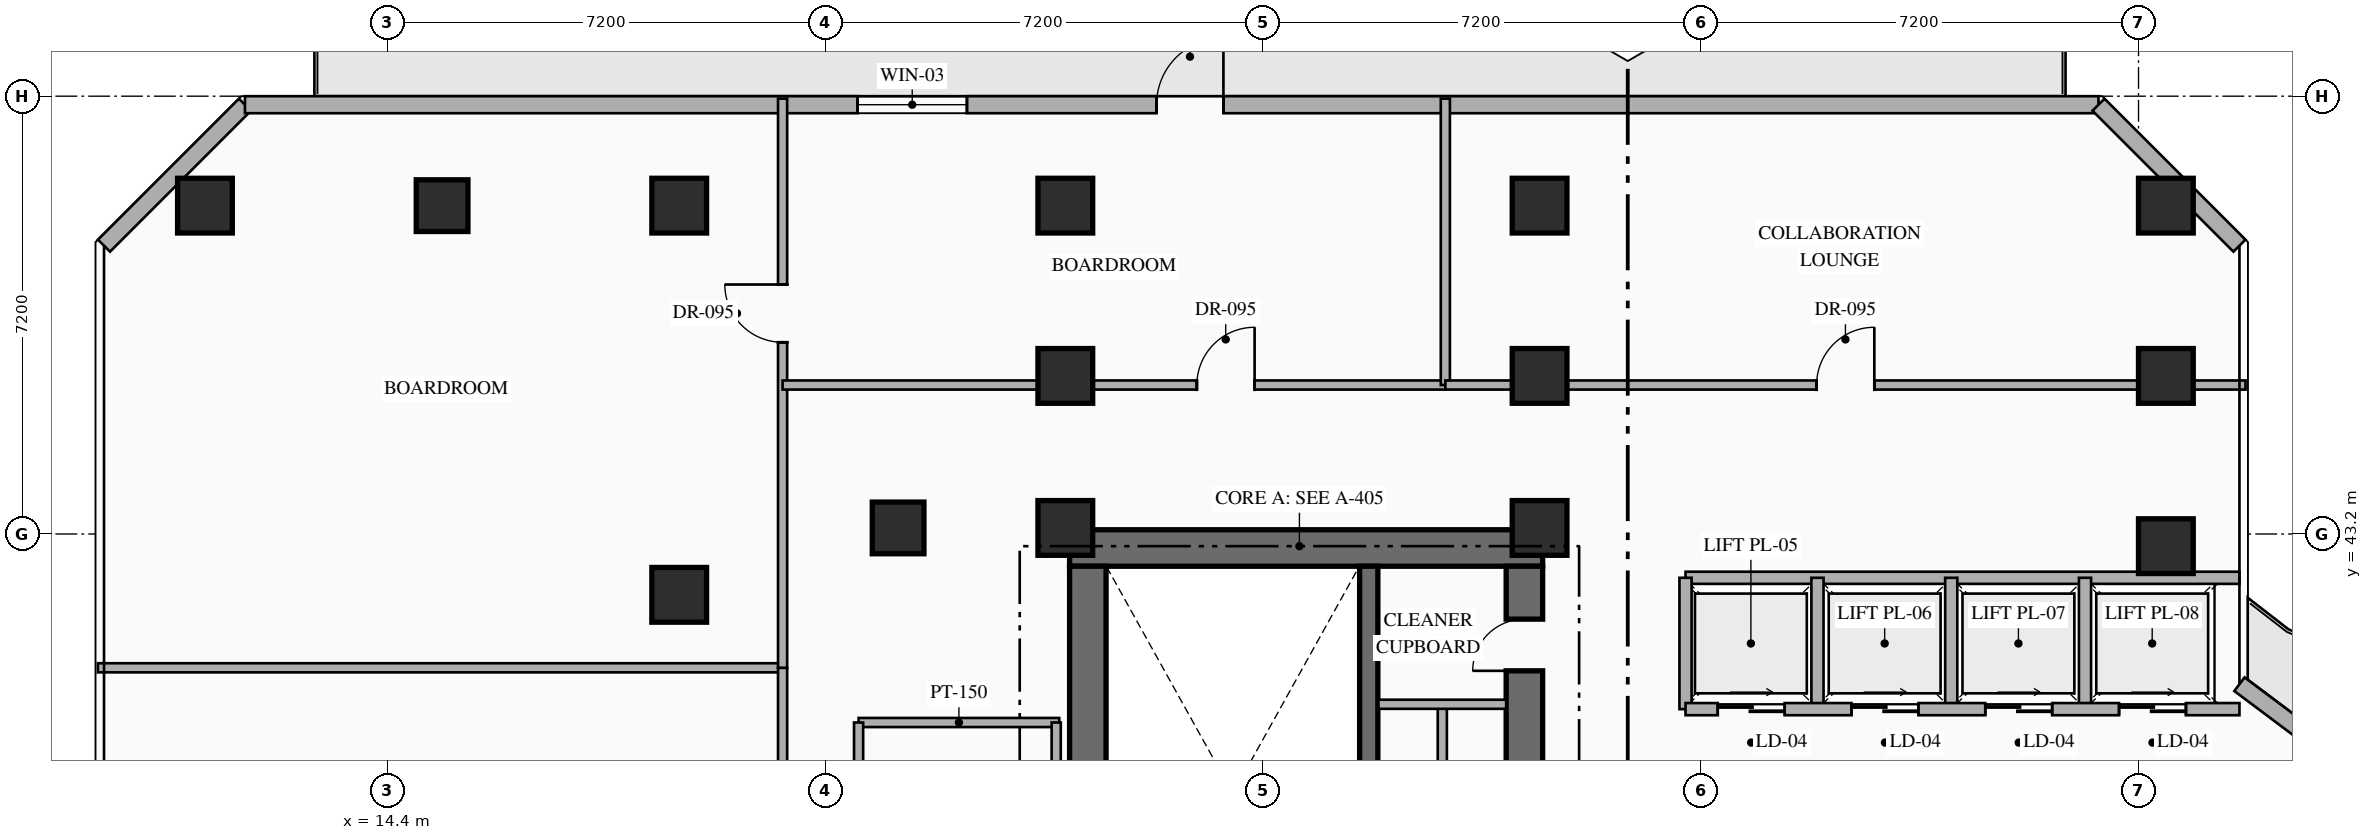
"""IFC4 building model, lengths in metres.
Left out: names, types, materials, properties, quantities, classifications, styles, units other than length and angle.
Written with IfcOpenShell. Run it as: python <this file> out.ifc"""

import sys

from ifc_helpers import new_model, si_unit, direction, frame, frame_2d, origin, origin_2d, place, context, subcontext, project, spatial, rectangle, hollow_rectangle, extrude, element, fill, save


model = new_model("IFC4")
c1 = context("Model", 3, precision=1e-05, world=origin(), true_north=direction((0.0, 1.0)))
c2 = subcontext(c1, "Body", "Model", "MODEL_VIEW")
j1 = project(units=[si_unit("LENGTHUNIT", "METRE"), si_unit("PLANEANGLEUNIT", "RADIAN")], contexts=[c1])
p1 = place(None, origin())
s1 = spatial("IfcSite", under=j1, at=p1, CompositionType="ELEMENT")
p2 = place(p1, origin())
s2 = spatial("IfcBuilding", under=s1, at=p2, CompositionType="ELEMENT")
p3 = place(p2, frame((0.0, 0.0, 119.25)))
s3 = spatial("IfcBuildingStorey", under=s2, at=p3, CompositionType="ELEMENT", Elevation=119.25)
p4 = place(p3, frame((25.62, 42.97, 0.0), z_axis=(0.0, 0.0, 1.0), x_axis=(1.0, 0.0, 0.0)))
e1 = element("IfcWall", 1, at=p4, inside=s3, PredefinedType="SHEAR", context=c2, shape_type="SweptSolid", body=[
    extrude(rectangle(XDim=7.78, YDim=0.6, at=frame_2d((3.89, 0.0))), origin(), (0.0, 0.0, 1.0), 3.6),
])
p5 = place(p3, frame((25.92, 33.19, 0.0), z_axis=(0.0, 0.0, 1.0), x_axis=(0.0, 1.0, 0.0)))
e2 = element("IfcWall", 2, at=p5, inside=s3, PredefinedType="SHEAR", context=c2, shape_type="SweptSolid", body=[
    extrude(rectangle(XDim=9.48, YDim=0.6, at=frame_2d((4.74, 0.0))), origin(), (0.0, 0.0, 1.0), 3.6),
])
p6 = place(p3, frame((33.1, 33.19, 0.0), z_axis=(0.0, 0.0, 1.0), x_axis=(0.0, 1.0, 0.0)))
e3 = element("IfcWall", 3, at=p6, inside=s3, PredefinedType="SHEAR", context=c2, shape_type="SweptSolid", body=[
    extrude(rectangle(XDim=9.48, YDim=0.6, at=frame_2d((4.74, 0.0))), origin(), (0.0, 0.0, 1.0), 3.6),
])
p7 = place(p6, frame((4.71, 0.0, 0.0)))
e4 = element("IfcOpeningElement", 4, at=p7, cuts=e3, PredefinedType="OPENING", context=c2, shape_type="SweptSolid", body=[
    extrude(rectangle(XDim=0.85, YDim=2.08, at=frame_2d((0.425, 1.04))), frame((0.0, 0.31, 0.0), z_axis=(0.0, -1.0, 0.0), x_axis=(1.0, 0.0, 0.0)), (0.0, 0.0, 1.0), 0.62),
])
p8 = place(p6, frame((7.76, 0.0, 0.0)))
e5 = element("IfcOpeningElement", 5, at=p8, cuts=e3, PredefinedType="OPENING", context=c2, shape_type="SweptSolid", body=[
    extrude(rectangle(XDim=0.85, YDim=2.08, at=frame_2d((0.425, 1.04))), frame((0.0, 0.31, 0.0), z_axis=(0.0, -1.0, 0.0), x_axis=(1.0, 0.0, 0.0)), (0.0, 0.0, 1.0), 0.62),
])
p9 = place(p3, frame((30.54, 33.19, 0.0), z_axis=(0.0, 0.0, 1.0), x_axis=(0.0, 1.0, 0.0)))
e6 = element("IfcWall", 6, at=p9, inside=s3, PredefinedType="SHEAR", context=c2, shape_type="SweptSolid", body=[
    extrude(rectangle(XDim=9.48, YDim=0.3, at=frame_2d((4.74, 0.0))), origin(), (0.0, 0.0, 1.0), 3.6),
])
for number, where, z_axis, x_axis in (
    (7, (25.55, 43.3, 0.0), (0.0, 0.0, 1.0), (1.0, 0.0, 0.0)),
    (8, (33.35, 43.3, 0.0), (0.0, 0.0, 1.0), (1.0, 0.0, 0.0)),
    (9, (43.65, 43.0, 0.0), (0.0, 0.0, 1.0), (1.0, 0.0, 0.0)),
):
    element("IfcColumn", number, at=place(p3, frame(where, z_axis=z_axis, x_axis=x_axis)), inside=s3, PredefinedType="COLUMN", context=c2, shape_type="SweptSolid", body=[
        extrude(rectangle(XDim=0.9, YDim=0.9, at=origin_2d()), origin(), (0.0, 0.0, 1.0), 3.6),
    ])
for number, where, z_axis, x_axis in (
    (10, (25.55, 45.8, 0.0), (0.0, 0.0, 1.0), (1.0, 0.0, 0.0)),
    (11, (33.35, 45.8, 0.0), (0.0, 0.0, 1.0), (1.0, 0.0, 0.0)),
    (12, (43.65, 45.8, 0.0), (0.0, 0.0, 1.0), (1.0, 0.0, 0.0)),
    (13, (11.4, 48.6, 0.0), (0.0, 0.0, 1.0), (1.0, 0.0, 0.0)),
    (14, (19.2, 48.6, 0.0), (0.0, 0.0, 1.0), (1.0, 0.0, 0.0)),
    (15, (25.55, 48.6, 0.0), (0.0, 0.0, 1.0), (1.0, 0.0, 0.0)),
    (16, (33.35, 48.6, 0.0), (0.0, 0.0, 1.0), (1.0, 0.0, 0.0)),
    (17, (43.65, 48.6, 0.0), (0.0, 0.0, 1.0), (1.0, 0.0, 0.0)),
    (18, (19.2, 42.2, 0.0), (0.0, 0.0, 1.0), (1.0, 0.0, 0.0)),
):
    element("IfcColumn", number, at=place(p3, frame(where, z_axis=z_axis, x_axis=x_axis)), inside=s3, PredefinedType="COLUMN", context=c2, shape_type="SweptSolid", body=[
        extrude(hollow_rectangle(XDim=0.9, YDim=0.9, WallThickness=0.036, at=origin_2d()), origin(), (0.0, 0.0, 1.0), 3.6),
    ])
for number, where, z_axis, x_axis in (
    (19, (22.8, 43.3, 0.0), (0.0, 0.0, 1.0), (1.0, 0.0, 0.0)),
    (20, (15.3, 48.6, 0.0), (0.0, 0.0, 1.0), (1.0, 0.0, 0.0)),
):
    element("IfcColumn", number, at=place(p3, frame(where, z_axis=z_axis, x_axis=x_axis)), inside=s3, PredefinedType="COLUMN", context=c2, shape_type="SweptSolid", body=[
        extrude(hollow_rectangle(XDim=0.85, YDim=0.85, WallThickness=0.032, at=origin_2d()), origin(), (0.0, 0.0, 1.0), 3.6),
    ])
p10 = place(p3, frame((44.86, 40.73, 0.0), z_axis=(0.0, 0.0, 1.0), x_axis=(0.800006902154, -0.599990797017, 0.0)))
e21 = element("IfcWall", 21, at=p10, inside=s3, PredefinedType="STANDARD", context=c2, shape_type="SweptSolid", body=[
    extrude(rectangle(XDim=29.712, YDim=0.28, at=frame_2d((14.856, 0.0))), origin(), (0.0, 0.0, 1.0), 3.35),
])
p11 = place(p10, frame((14.249, 0.0, 0.0)))
e22 = element("IfcOpeningElement", 22, at=p11, cuts=e21, PredefinedType="OPENING", context=c2, shape_type="SweptSolid", body=[
    extrude(rectangle(XDim=1.1, YDim=2.2, at=frame_2d((0.55, 1.1))), frame((0.0, 0.15, 0.0), z_axis=(0.0, -1.0, 0.0), x_axis=(1.0, 0.0, 0.0)), (0.0, 0.0, 1.0), 0.3),
])
p12 = place(p10, frame((6.528, 0.0, 0.85)))
e23 = element("IfcOpeningElement", 23, at=p12, cuts=e21, PredefinedType="OPENING", context=c2, shape_type="SweptSolid", body=[
    extrude(rectangle(XDim=1.8, YDim=2.1, at=frame_2d((0.9, 1.05))), frame((0.0, 0.15, 0.0), z_axis=(0.0, -1.0, 0.0), x_axis=(1.0, 0.0, 0.0)), (0.0, 0.0, 1.0), 0.3),
])
p13 = place(p10, frame((21.384, 0.0, 0.85)))
e24 = element("IfcOpeningElement", 24, at=p13, cuts=e21, PredefinedType="OPENING", context=c2, shape_type="SweptSolid", body=[
    extrude(rectangle(XDim=1.8, YDim=2.1, at=frame_2d((0.9, 1.05))), frame((0.0, 0.15, 0.0), z_axis=(0.0, -1.0, 0.0), x_axis=(1.0, 0.0, 0.0)), (0.0, 0.0, 1.0), 0.3),
])
p14 = place(p3, frame((9.74, 47.942, 0.0), z_axis=(0.0, 0.0, 1.0), x_axis=(0.707106781187, 0.707106781187, 0.0)))
e25 = element("IfcWall", 25, at=p14, inside=s3, PredefinedType="STANDARD", context=c2, shape_type="SweptSolid", body=[
    extrude(rectangle(XDim=3.278, YDim=0.28, at=frame_2d((1.639, 0.0))), origin(), (0.0, 0.0, 1.0), 3.35),
])
p15 = place(p3, frame((12.058, 50.26, 0.0), z_axis=(0.0, 0.0, 1.0), x_axis=(1.0, 0.0, 0.0)))
e26 = element("IfcWall", 26, at=p15, inside=s3, PredefinedType="STANDARD", context=c2, shape_type="SweptSolid", body=[
    extrude(rectangle(XDim=30.484, YDim=0.28, at=frame_2d((15.242, 0.0))), origin(), (0.0, 0.0, 1.0), 3.35),
])
p16 = place(p15, frame((14.992, 0.0, 0.0)))
e27 = element("IfcOpeningElement", 27, at=p16, cuts=e26, PredefinedType="OPENING", context=c2, shape_type="SweptSolid", body=[
    extrude(rectangle(XDim=1.1, YDim=2.2, at=frame_2d((0.55, 1.1))), frame((0.0, 0.15, 0.0), z_axis=(0.0, -1.0, 0.0), x_axis=(1.0, 0.0, 0.0)), (0.0, 0.0, 1.0), 0.3),
])
p17 = place(p15, frame((10.074, 0.0, 0.85)))
e28 = element("IfcOpeningElement", 28, at=p17, cuts=e26, PredefinedType="OPENING", context=c2, shape_type="SweptSolid", body=[
    extrude(rectangle(XDim=1.8, YDim=2.1, at=frame_2d((0.9, 1.05))), frame((0.0, 0.15, 0.0), z_axis=(0.0, -1.0, 0.0), x_axis=(1.0, 0.0, 0.0)), (0.0, 0.0, 1.0), 0.3),
])
p18 = place(p3, frame((42.542, 50.26, 0.0), z_axis=(0.0, 0.0, 1.0), x_axis=(0.707106781187, -0.707106781187, 0.0)))
e29 = element("IfcWall", 29, at=p18, inside=s3, PredefinedType="STANDARD", context=c2, shape_type="SweptSolid", body=[
    extrude(rectangle(XDim=3.278, YDim=0.28, at=frame_2d((1.639, 0.0))), origin(), (0.0, 0.0, 1.0), 3.35),
])
p19 = place(p3, frame((31.75, 36.18, 0.0), z_axis=(0.0, 0.0, 1.0), x_axis=(0.0, 1.0, 0.0)))
e30 = element("IfcWall", 30, at=p19, inside=s3, PredefinedType="PARTITIONING", context=c2, shape_type="SweptSolid", body=[
    extrude(rectangle(XDim=4.24, YDim=0.15, at=frame_2d((2.12, 0.0))), origin(), (0.0, 0.0, 1.0), 3.35),
])
p20 = place(p19, frame((1.695, 0.0, 0.0)))
e31 = element("IfcOpeningElement", 31, at=p20, cuts=e30, PredefinedType="OPENING", context=c2, shape_type="SweptSolid", body=[
    extrude(rectangle(XDim=0.85, YDim=2.08, at=frame_2d((0.425, 1.04))), frame((0.0, 0.085, 0.0), z_axis=(0.0, -1.0, 0.0), x_axis=(1.0, 0.0, 0.0)), (0.0, 0.0, 1.0), 0.17),
])
p21 = place(p3, frame((30.7, 40.4, 0.0), z_axis=(0.0, 0.0, 1.0), x_axis=(1.0, 0.0, 0.0)))
e32 = element("IfcWall", 32, at=p21, inside=s3, PredefinedType="PARTITIONING", context=c2, shape_type="SweptSolid", body=[
    extrude(rectangle(XDim=2.1, YDim=0.15, at=frame_2d((1.05, 0.0))), origin(), (0.0, 0.0, 1.0), 3.35),
])
p22 = place(p3, frame((35.75, 42.48, 0.0), z_axis=(0.0, 0.0, 1.0), x_axis=(1.0, 0.0, 0.0)))
e33 = element("IfcWall", 33, at=p22, inside=s3, PredefinedType="STANDARD", context=c2, shape_type="SweptSolid", body=[
    extrude(rectangle(XDim=9.11, YDim=0.2, at=frame_2d((4.555, 0.0))), origin(), (0.0, 0.0, 1.0), 3.35),
])
for number, where, z_axis, x_axis in (
    (34, (35.75, 40.32, 0.0), (0.0, 0.0, 1.0), (0.0, 1.0, 0.0)),
    (35, (37.92, 40.32, 0.0), (0.0, 0.0, 1.0), (0.0, 1.0, 0.0)),
    (36, (40.12, 40.32, 0.0), (0.0, 0.0, 1.0), (0.0, 1.0, 0.0)),
    (37, (42.32, 40.32, 0.0), (0.0, 0.0, 1.0), (0.0, 1.0, 0.0)),
):
    element("IfcWall", number, at=place(p3, frame(where, z_axis=z_axis, x_axis=x_axis)), inside=s3, PredefinedType="STANDARD", context=c2, shape_type="SweptSolid", body=[
        extrude(rectangle(XDim=2.16, YDim=0.2, at=frame_2d((1.08, 0.0))), origin(), (0.0, 0.0, 1.0), 3.35),
    ])
p23 = place(p3, frame((35.75, 40.32, 0.0), z_axis=(0.0, 0.0, 1.0), x_axis=(1.0, 0.0, 0.0)))
e38 = element("IfcWall", 38, at=p23, inside=s3, PredefinedType="STANDARD", context=c2, shape_type="SweptSolid", body=[
    extrude(rectangle(XDim=9.11, YDim=0.2, at=frame_2d((4.555, 0.0))), origin(), (0.0, 0.0, 1.0), 3.35),
])
p24 = place(p23, frame((0.53, 0.0, 0.0)))
e39 = element("IfcOpeningElement", 39, at=p24, cuts=e38, PredefinedType="OPENING", context=c2, shape_type="SweptSolid", body=[
    extrude(rectangle(XDim=1.1, YDim=2.18, at=frame_2d((0.55, 1.09))), frame((0.0, 0.11, 0.0), z_axis=(0.0, -1.0, 0.0), x_axis=(1.0, 0.0, 0.0)), (0.0, 0.0, 1.0), 0.22),
])
p25 = place(p23, frame((2.73, 0.0, 0.0)))
e40 = element("IfcOpeningElement", 40, at=p25, cuts=e38, PredefinedType="OPENING", context=c2, shape_type="SweptSolid", body=[
    extrude(rectangle(XDim=1.1, YDim=2.18, at=frame_2d((0.55, 1.09))), frame((0.0, 0.11, 0.0), z_axis=(0.0, -1.0, 0.0), x_axis=(1.0, 0.0, 0.0)), (0.0, 0.0, 1.0), 0.22),
])
p26 = place(p23, frame((4.93, 0.0, 0.0)))
e41 = element("IfcOpeningElement", 41, at=p26, cuts=e38, PredefinedType="OPENING", context=c2, shape_type="SweptSolid", body=[
    extrude(rectangle(XDim=1.1, YDim=2.18, at=frame_2d((0.55, 1.09))), frame((0.0, 0.11, 0.0), z_axis=(0.0, -1.0, 0.0), x_axis=(1.0, 0.0, 0.0)), (0.0, 0.0, 1.0), 0.22),
])
p27 = place(p23, frame((7.13, 0.0, 0.0)))
e42 = element("IfcOpeningElement", 42, at=p27, cuts=e38, PredefinedType="OPENING", context=c2, shape_type="SweptSolid", body=[
    extrude(rectangle(XDim=1.1, YDim=2.18, at=frame_2d((0.55, 1.09))), frame((0.0, 0.11, 0.0), z_axis=(0.0, -1.0, 0.0), x_axis=(1.0, 0.0, 0.0)), (0.0, 0.0, 1.0), 0.22),
])
p28 = place(p3, frame((22.15, 40.1, 0.0), z_axis=(0.0, 0.0, 1.0), x_axis=(1.0, 0.0, 0.0)))
e43 = element("IfcWall", 43, at=p28, inside=s3, PredefinedType="PARTITIONING", context=c2, shape_type="SweptSolid", body=[
    extrude(rectangle(XDim=3.3, YDim=0.15, at=frame_2d((1.65, 0.0))), origin(), (0.0, 0.0, 1.0), 3.35),
])
p29 = place(p3, frame((25.4, 33.5, 0.0), z_axis=(0.0, 0.0, 1.0), x_axis=(0.0, 1.0, 0.0)))
e44 = element("IfcWall", 44, at=p29, inside=s3, PredefinedType="PARTITIONING", context=c2, shape_type="SweptSolid", body=[
    extrude(rectangle(XDim=6.6, YDim=0.15, at=frame_2d((3.3, 0.0))), origin(), (0.0, 0.0, 1.0), 3.35),
])
p30 = place(p3, frame((22.15, 37.9, 0.0), z_axis=(0.0, 0.0, 1.0), x_axis=(0.0, 1.0, 0.0)))
e45 = element("IfcWall", 45, at=p30, inside=s3, PredefinedType="PARTITIONING", context=c2, shape_type="SweptSolid", body=[
    extrude(rectangle(XDim=2.2, YDim=0.15, at=frame_2d((1.1, 0.0))), origin(), (0.0, 0.0, 1.0), 3.35),
])
p31 = place(p30, frame((0.7, 0.0, 0.0)))
e46 = element("IfcOpeningElement", 46, at=p31, cuts=e45, PredefinedType="OPENING", context=c2, shape_type="SweptSolid", body=[
    extrude(rectangle(XDim=0.8, YDim=2.06, at=frame_2d((0.4, 1.03))), frame((0.0, 0.085, 0.0), z_axis=(0.0, -1.0, 0.0), x_axis=(1.0, 0.0, 0.0)), (0.0, 0.0, 1.0), 0.17),
])
p32 = place(p3, frame((9.64, 41.0, 0.0), z_axis=(0.0, 0.0, 1.0), x_axis=(1.0, 0.0, 0.0)))
e47 = element("IfcWall", 47, at=p32, inside=s3, PredefinedType="PARTITIONING", context=c2, shape_type="SweptSolid", body=[
    extrude(rectangle(XDim=11.26, YDim=0.15, at=frame_2d((5.63, 0.0))), origin(), (0.0, 0.0, 1.0), 2.995),
])
p33 = place(p3, frame((20.9, 31.2, 0.0), z_axis=(0.0, 0.0, 1.0), x_axis=(0.0, 1.0, 0.0)))
e48 = element("IfcWall", 48, at=p33, inside=s3, PredefinedType="PARTITIONING", context=c2, shape_type="SweptSolid", body=[
    extrude(rectangle(XDim=9.8, YDim=0.15, at=frame_2d((4.9, 0.0))), origin(), (0.0, 0.0, 1.0), 3.35),
])
p34 = place(p33, frame((0.784, 0.0, 0.0)))
e49 = element("IfcOpeningElement", 49, at=p34, cuts=e48, PredefinedType="OPENING", context=c2, shape_type="SweptSolid", body=[
    extrude(rectangle(XDim=0.95, YDim=2.15, at=frame_2d((0.475, 1.075))), frame((0.0, 0.085, 0.0), z_axis=(0.0, -1.0, 0.0), x_axis=(1.0, 0.0, 0.0)), (0.0, 0.0, 1.0), 0.17),
])
p35 = place(p3, frame((20.9, 41.0, 0.0), z_axis=(0.0, 0.0, 1.0), x_axis=(0.0, 1.0, 0.0)))
e50 = element("IfcWall", 50, at=p35, inside=s3, PredefinedType="PARTITIONING", context=c2, shape_type="SweptSolid", body=[
    extrude(rectangle(XDim=9.36, YDim=0.15, at=frame_2d((4.68, 0.0))), origin(), (0.0, 0.0, 1.0), 3.35),
])
p36 = place(p35, frame((5.353, 0.0, 0.0)))
e51 = element("IfcOpeningElement", 51, at=p36, cuts=e50, PredefinedType="OPENING", context=c2, shape_type="SweptSolid", body=[
    extrude(rectangle(XDim=0.95, YDim=2.15, at=frame_2d((0.475, 1.075))), frame((0.0, 0.085, 0.0), z_axis=(0.0, -1.0, 0.0), x_axis=(1.0, 0.0, 0.0)), (0.0, 0.0, 1.0), 0.17),
])
p37 = place(p3, frame((20.9, 45.65, 0.0), z_axis=(0.0, 0.0, 1.0), x_axis=(1.0, 0.0, 0.0)))
e52 = element("IfcWall", 52, at=p37, inside=s3, PredefinedType="PARTITIONING", context=c2, shape_type="SweptSolid", body=[
    extrude(rectangle(XDim=10.9, YDim=0.15, at=frame_2d((5.45, 0.0))), origin(), (0.0, 0.0, 1.0), 2.695),
])
p38 = place(p37, frame((6.813, 0.0, 0.0)))
e53 = element("IfcOpeningElement", 53, at=p38, cuts=e52, PredefinedType="OPENING", context=c2, shape_type="SweptSolid", body=[
    extrude(rectangle(XDim=0.95, YDim=2.15, at=frame_2d((0.475, 1.075))), frame((0.0, 0.085, 0.0), z_axis=(0.0, -1.0, 0.0), x_axis=(1.0, 0.0, 0.0)), (0.0, 0.0, 1.0), 0.17),
])
p39 = place(p3, frame((31.8, 45.65, 0.0), z_axis=(0.0, 0.0, 1.0), x_axis=(0.0, 1.0, 0.0)))
e54 = element("IfcWall", 54, at=p39, inside=s3, PredefinedType="PARTITIONING", context=c2, shape_type="SweptSolid", body=[
    extrude(rectangle(XDim=4.71, YDim=0.15, at=frame_2d((2.355, 0.0))), origin(), (0.0, 0.0, 1.0), 3.35),
])
p40 = place(p3, frame((31.8, 45.65, 0.0), z_axis=(0.0, 0.0, 1.0), x_axis=(1.0, 0.0, 0.0)))
e55 = element("IfcWall", 55, at=p40, inside=s3, PredefinedType="PARTITIONING", context=c2, shape_type="SweptSolid", body=[
    extrude(rectangle(XDim=13.16, YDim=0.15, at=frame_2d((6.58, 0.0))), origin(), (0.0, 0.0, 1.0), 2.695),
])
p41 = place(p40, frame((6.105, 0.0, 0.0)))
e56 = element("IfcOpeningElement", 56, at=p41, cuts=e55, PredefinedType="OPENING", context=c2, shape_type="SweptSolid", body=[
    extrude(rectangle(XDim=0.95, YDim=2.15, at=frame_2d((0.475, 1.075))), frame((0.0, 0.085, 0.0), z_axis=(0.0, -1.0, 0.0), x_axis=(1.0, 0.0, 0.0)), (0.0, 0.0, 1.0), 0.17),
])
p42 = place(p16, origin())
e57 = element("IfcDoor", 57, at=p42, inside=s3, OperationType="SINGLE_SWING_RIGHT", PredefinedType="DOOR", context=c2, shape_type="SweptSolid", body=[
    extrude(rectangle(XDim=1.1, YDim=2.2, at=frame_2d((0.55, 1.1))), frame((0.0, 0.025, 0.0), z_axis=(0.0, -1.0, 0.0), x_axis=(1.0, 0.0, 0.0)), (0.0, 0.0, 1.0), 0.05),
])
fill(e27, e57)
p43 = place(p17, origin())
e58 = element("IfcWindow", 58, at=p43, inside=s3, PartitioningType="SINGLE_PANEL", PredefinedType="WINDOW", context=c2, shape_type="SweptSolid", body=[
    extrude(rectangle(XDim=1.8, YDim=2.1, at=frame_2d((0.9, 1.05))), frame((0.0, 0.03, 0.0), z_axis=(0.0, -1.0, 0.0), x_axis=(1.0, 0.0, 0.0)), (0.0, 0.0, 1.0), 0.06),
])
fill(e28, e58)
p44 = place(p8, origin())
e59 = element("IfcDoor", 59, at=p44, inside=s3, OperationType="SINGLE_SWING_LEFT", PredefinedType="DOOR", context=c2, shape_type="SweptSolid", body=[
    extrude(rectangle(XDim=0.85, YDim=2.08, at=frame_2d((0.425, 1.04))), frame((0.0, 0.025, 0.0), z_axis=(0.0, -1.0, 0.0), x_axis=(1.0, 0.0, 0.0)), (0.0, 0.0, 1.0), 0.05),
])
fill(e5, e59)
p45 = place(p24, origin())
e60 = element("IfcDoor", 60, at=p45, inside=s3, OperationType="SLIDING_TO_RIGHT", PredefinedType="USERDEFINED", context=c2, shape_type="SweptSolid", body=[
    extrude(rectangle(XDim=1.1, YDim=2.18, at=frame_2d((0.55, 1.09))), frame((0.0, 0.025, 0.0), z_axis=(0.0, -1.0, 0.0), x_axis=(1.0, 0.0, 0.0)), (0.0, 0.0, 1.0), 0.05),
])
fill(e39, e60)
p46 = place(p25, origin())
e61 = element("IfcDoor", 61, at=p46, inside=s3, OperationType="SLIDING_TO_RIGHT", PredefinedType="USERDEFINED", context=c2, shape_type="SweptSolid", body=[
    extrude(rectangle(XDim=1.1, YDim=2.18, at=frame_2d((0.55, 1.09))), frame((0.0, 0.025, 0.0), z_axis=(0.0, -1.0, 0.0), x_axis=(1.0, 0.0, 0.0)), (0.0, 0.0, 1.0), 0.05),
])
fill(e40, e61)
p47 = place(p26, origin())
e62 = element("IfcDoor", 62, at=p47, inside=s3, OperationType="SLIDING_TO_RIGHT", PredefinedType="USERDEFINED", context=c2, shape_type="SweptSolid", body=[
    extrude(rectangle(XDim=1.1, YDim=2.18, at=frame_2d((0.55, 1.09))), frame((0.0, 0.025, 0.0), z_axis=(0.0, -1.0, 0.0), x_axis=(1.0, 0.0, 0.0)), (0.0, 0.0, 1.0), 0.05),
])
fill(e41, e62)
p48 = place(p27, origin())
e63 = element("IfcDoor", 63, at=p48, inside=s3, OperationType="SLIDING_TO_RIGHT", PredefinedType="USERDEFINED", context=c2, shape_type="SweptSolid", body=[
    extrude(rectangle(XDim=1.1, YDim=2.18, at=frame_2d((0.55, 1.09))), frame((0.0, 0.025, 0.0), z_axis=(0.0, -1.0, 0.0), x_axis=(1.0, 0.0, 0.0)), (0.0, 0.0, 1.0), 0.05),
])
fill(e42, e63)
p49 = place(p36, origin())
e64 = element("IfcDoor", 64, at=p49, inside=s3, OperationType="SINGLE_SWING_RIGHT", PredefinedType="DOOR", context=c2, shape_type="SweptSolid", body=[
    extrude(rectangle(XDim=0.95, YDim=2.15, at=frame_2d((0.475, 1.075))), frame((0.0, 0.025, 0.0), z_axis=(0.0, -1.0, 0.0), x_axis=(1.0, 0.0, 0.0)), (0.0, 0.0, 1.0), 0.05),
])
fill(e51, e64)
p50 = place(p38, origin())
e65 = element("IfcDoor", 65, at=p50, inside=s3, OperationType="SINGLE_SWING_RIGHT", PredefinedType="DOOR", context=c2, shape_type="SweptSolid", body=[
    extrude(rectangle(XDim=0.95, YDim=2.15, at=frame_2d((0.475, 1.075))), frame((0.0, 0.025, 0.0), z_axis=(0.0, -1.0, 0.0), x_axis=(1.0, 0.0, 0.0)), (0.0, 0.0, 1.0), 0.05),
])
fill(e53, e65)
p51 = place(p41, origin())
e66 = element("IfcDoor", 66, at=p51, inside=s3, OperationType="SINGLE_SWING_RIGHT", PredefinedType="DOOR", context=c2, shape_type="SweptSolid", body=[
    extrude(rectangle(XDim=0.95, YDim=2.15, at=frame_2d((0.475, 1.075))), frame((0.0, 0.025, 0.0), z_axis=(0.0, -1.0, 0.0), x_axis=(1.0, 0.0, 0.0)), (0.0, 0.0, 1.0), 0.05),
])
fill(e56, e66)
save(model, sys.argv[1])
